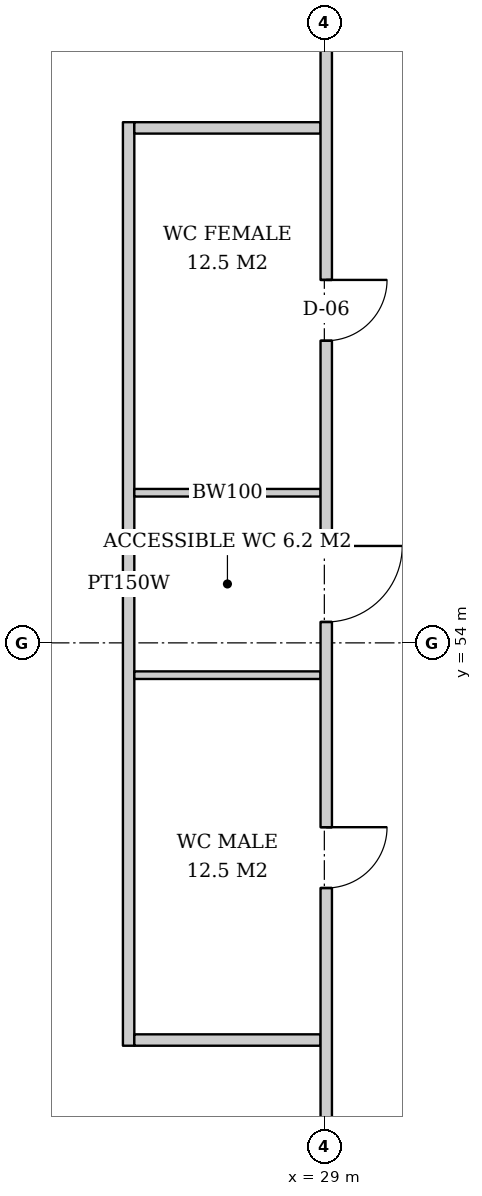
"""IFC4 building model, lengths in metres.
Left out: names, types, materials, properties, quantities, classifications, styles, units other than length and angle.
Written with IfcOpenShell. Run it as: python <this file> out.ifc"""

import sys

from ifc_helpers import new_model, si_unit, direction, frame, frame_2d, origin, place, context, subcontext, project, spatial, rectangle, extrude, element, fill, save


model = new_model("IFC4")
c1 = context("Model", 3, precision=1e-05, world=origin(), true_north=direction((0.0, 1.0)))
c2 = subcontext(c1, "Body", "Model", "MODEL_VIEW")
j1 = project(units=[si_unit("LENGTHUNIT", "METRE"), si_unit("PLANEANGLEUNIT", "RADIAN")], contexts=[c1])
p1 = place(None, origin())
s1 = spatial("IfcSite", under=j1, at=p1, CompositionType="ELEMENT")
p2 = place(p1, origin())
s2 = spatial("IfcBuilding", under=s1, at=p2, CompositionType="ELEMENT")
p3 = place(p2, frame((0.0, 0.0, 36.2)))
s3 = spatial("IfcBuildingStorey", under=s2, at=p3, CompositionType="ELEMENT", Elevation=36.2)
p4 = place(p3, frame((26.425, 60.85, 0.0), z_axis=(0.0, 0.0, 1.0), x_axis=(0.0, -1.0, 0.0)))
e1 = element("IfcWall", 1, at=p4, inside=s3, PredefinedType="PARTITIONING", context=c2, shape_type="SweptSolid", body=[
    extrude(rectangle(XDim=12.15, YDim=0.15, at=frame_2d((6.075, 0.0))), origin(), (0.0, 0.0, 1.0), 2.612),
])
p5 = place(p3, frame((28.95, 60.775, 0.0), z_axis=(0.0, 0.0, 1.0), x_axis=(-1.0, 0.0, 0.0)))
e2 = element("IfcWall", 2, at=p5, inside=s3, PredefinedType="PARTITIONING", context=c2, shape_type="SweptSolid", body=[
    extrude(rectangle(XDim=2.45, YDim=0.15, at=frame_2d((1.225, 0.0))), origin(), (0.0, 0.0, 1.0), 3.62),
])
for number, where, z_axis, x_axis in (
    (3, (28.95, 55.975, 0.0), (0.0, 0.0, 1.0), (-1.0, 0.0, 0.0)),
    (4, (28.95, 53.575, 0.0), (0.0, 0.0, 1.0), (-1.0, 0.0, 0.0)),
):
    element("IfcWall", number, at=place(p3, frame(where, z_axis=z_axis, x_axis=x_axis)), inside=s3, PredefinedType="SOLIDWALL", context=c2, shape_type="SweptSolid", body=[
        extrude(rectangle(XDim=2.45, YDim=0.1, at=frame_2d((1.225, 0.0))), origin(), (0.0, 0.0, 1.0), 3.62),
    ])
p6 = place(p3, frame((28.95, 48.775, 0.0), z_axis=(0.0, 0.0, 1.0), x_axis=(-1.0, 0.0, 0.0)))
e5 = element("IfcWall", 5, at=p6, inside=s3, PredefinedType="PARTITIONING", context=c2, shape_type="SweptSolid", body=[
    extrude(rectangle(XDim=2.45, YDim=0.15, at=frame_2d((1.225, 0.0))), origin(), (0.0, 0.0, 1.0), 3.62),
])
p7 = place(p3, frame((29.025, 62.05, 0.0), z_axis=(0.0, 0.0, 1.0), x_axis=(0.0, -1.0, 0.0)))
e6 = element("IfcWall", 6, at=p7, inside=s3, PredefinedType="PARTITIONING", context=c2, shape_type="SweptSolid", body=[
    extrude(rectangle(XDim=31.95, YDim=0.15, at=frame_2d((15.975, 0.0))), origin(), (0.0, 0.0, 1.0), 2.612),
])
p8 = place(p7, frame((3.275, 0.0, 0.0)))
e7 = element("IfcOpeningElement", 7, at=p8, cuts=e6, PredefinedType="OPENING", context=c2, shape_type="SweptSolid", body=[
    extrude(rectangle(XDim=0.8, YDim=2.1, at=frame_2d((0.4, 1.05))), frame((0.0, 0.085, 0.0), z_axis=(0.0, -1.0, 0.0), x_axis=(1.0, 0.0, 0.0)), (0.0, 0.0, 1.0), 0.17),
])
p9 = place(p7, frame((6.775, 0.0, 0.0)))
e8 = element("IfcOpeningElement", 8, at=p9, cuts=e6, PredefinedType="OPENING", context=c2, shape_type="SweptSolid", body=[
    extrude(rectangle(XDim=1.0, YDim=2.1, at=frame_2d((0.5, 1.05))), frame((0.0, 0.085, 0.0), z_axis=(0.0, -1.0, 0.0), x_axis=(1.0, 0.0, 0.0)), (0.0, 0.0, 1.0), 0.17),
])
p10 = place(p7, frame((10.475, 0.0, 0.0)))
e9 = element("IfcOpeningElement", 9, at=p10, cuts=e6, PredefinedType="OPENING", context=c2, shape_type="SweptSolid", body=[
    extrude(rectangle(XDim=0.8, YDim=2.1, at=frame_2d((0.4, 1.05))), frame((0.0, 0.085, 0.0), z_axis=(0.0, -1.0, 0.0), x_axis=(1.0, 0.0, 0.0)), (0.0, 0.0, 1.0), 0.17),
])
p11 = place(p8, origin())
e10 = element("IfcDoor", 10, at=p11, inside=s3, OperationType="SINGLE_SWING_LEFT", PredefinedType="DOOR", context=c2, shape_type="SweptSolid", body=[
    extrude(rectangle(XDim=0.8, YDim=2.1, at=frame_2d((0.4, 1.05))), frame((0.0, 0.025, 0.0), z_axis=(0.0, -1.0, 0.0), x_axis=(1.0, 0.0, 0.0)), (0.0, 0.0, 1.0), 0.05),
])
fill(e7, e10)
p12 = place(p9, origin())
e11 = element("IfcDoor", 11, at=p12, inside=s3, OperationType="SINGLE_SWING_LEFT", PredefinedType="DOOR", context=c2, shape_type="SweptSolid", body=[
    extrude(rectangle(XDim=1.0, YDim=2.1, at=frame_2d((0.5, 1.05))), frame((0.0, 0.025, 0.0), z_axis=(0.0, -1.0, 0.0), x_axis=(1.0, 0.0, 0.0)), (0.0, 0.0, 1.0), 0.05),
])
fill(e8, e11)
p13 = place(p10, origin())
e12 = element("IfcDoor", 12, at=p13, inside=s3, OperationType="SINGLE_SWING_LEFT", PredefinedType="DOOR", context=c2, shape_type="SweptSolid", body=[
    extrude(rectangle(XDim=0.8, YDim=2.1, at=frame_2d((0.4, 1.05))), frame((0.0, 0.025, 0.0), z_axis=(0.0, -1.0, 0.0), x_axis=(1.0, 0.0, 0.0)), (0.0, 0.0, 1.0), 0.05),
])
fill(e9, e12)
save(model, sys.argv[1])
